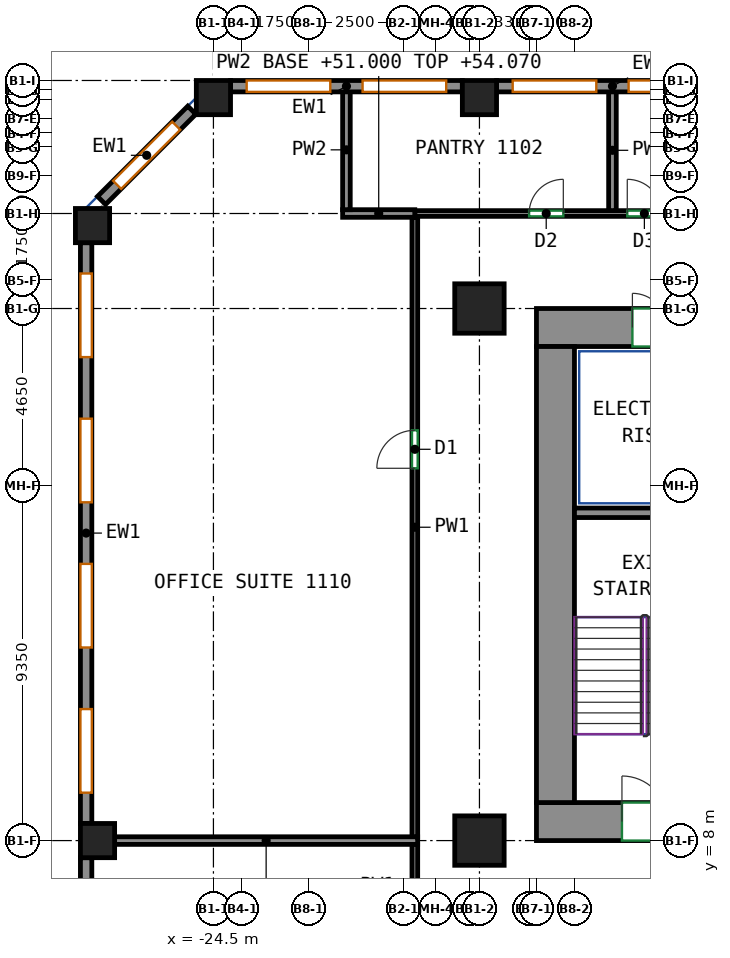
"""IFC4 building model, lengths in metres.
Left out: names, types, materials, properties, quantities, classifications, styles, units other than length and angle.
Written with IfcOpenShell. Run it as: python <this file> out.ifc"""

import sys

from ifc_helpers import new_model, si_unit, direction, frame, frame_2d, origin, origin_2d, place, context, subcontext, project, spatial, rectangle, extrude, source, transform, mapped, element, fill, save


model = new_model("IFC4")
c1 = context("Model", 3, precision=1e-05, world=origin(), true_north=direction((0.0, 1.0)))
c2 = subcontext(c1, "Body", "Model", "MODEL_VIEW")
j1 = project(units=[si_unit("LENGTHUNIT", "METRE"), si_unit("PLANEANGLEUNIT", "RADIAN")], contexts=[c1])
p1 = place(None, origin())
s1 = spatial("IfcSite", under=j1, at=p1, CompositionType="ELEMENT")
p2 = place(p1, origin())
s2 = spatial("IfcBuilding", under=s1, at=p2, CompositionType="ELEMENT")
p3 = place(p2, frame((0.0, 0.0, 51.0)))
s3 = spatial("IfcBuildingStorey", under=s2, at=p3, CompositionType="ELEMENT", Elevation=51.0)
m1 = source(origin(), c2, "Body", "SweptSolid", [
    extrude(rectangle(XDim=0.9, YDim=0.9, at=origin_2d()), origin(), (0.0, 0.0, 1.0), 3.72),
])
for number, where, z_axis, x_axis in (
    (1, (-27.682, 24.182, 0.0), (0.0, 0.0, 1.0), (1.0, 0.0, 0.0)),
    (2, (-27.55, 8.0, 0.0), (0.0, 0.0, 1.0), (1.0, 0.0, 0.0)),
    (3, (-24.5, 27.55, 0.0), (0.0, 0.0, 1.0), (1.0, 0.0, 0.0)),
):
    element("IfcColumn", number, at=place(p3, frame(where, z_axis=z_axis, x_axis=x_axis)), inside=s3, PredefinedType="COLUMN", context=c2, shape_type="MappedRepresentation", body=[
        mapped(m1, transform((0.0, 0.0, 0.0))),
    ])
m2 = source(origin(), c2, "Body", "SweptSolid", [
    extrude(rectangle(XDim=1.3, YDim=1.3, at=origin_2d()), origin(), (0.0, 0.0, 1.0), 3.72),
])
for number, where, z_axis, x_axis in (
    (4, (-17.5, 8.0, 0.0), (0.0, 0.0, 1.0), (1.0, 0.0, 0.0)),
    (5, (-17.5, 22.0, 0.0), (0.0, 0.0, 1.0), (1.0, 0.0, 0.0)),
):
    element("IfcColumn", number, at=place(p3, frame(where, z_axis=z_axis, x_axis=x_axis)), inside=s3, PredefinedType="COLUMN", context=c2, shape_type="MappedRepresentation", body=[
        mapped(m2, transform((0.0, 0.0, 0.0))),
    ])
p4 = place(p3, frame((-17.5, 27.55, 0.0), z_axis=(0.0, 0.0, 1.0), x_axis=(1.0, 0.0, 0.0)))
e6 = element("IfcColumn", 6, at=p4, inside=s3, PredefinedType="COLUMN", context=c2, shape_type="MappedRepresentation", body=[
    mapped(m1, transform((0.0, 0.0, 0.0))),
])
m3 = source(origin(), c2, "Body", "SweptSolid", [
    extrude(rectangle(XDim=5.63, YDim=1.0, at=frame_2d((2.815, 0.0))), origin(), (0.0, 0.0, 1.0), 3.72),
])
p5 = place(p3, frame((-16.0, 8.5, 0.0), z_axis=(0.0, 0.0, 1.0), x_axis=(1.0, 0.0, 0.0)))
e7 = element("IfcWall", 7, at=p5, inside=s3, PredefinedType="SHEAR", context=c2, shape_type="MappedRepresentation", body=[
    mapped(m3, transform((0.0, 0.0, 0.0))),
])
p6 = place(p5, frame((2.25, 0.0, 0.0)))
e8 = element("IfcOpeningElement", 8, at=p6, cuts=e7, PredefinedType="OPENING", context=c2, shape_type="SweptSolid", body=[
    extrude(rectangle(XDim=1.2, YDim=2.1, at=frame_2d((0.6, 1.05))), frame((0.0, 0.51, 0.0), z_axis=(0.0, -1.0, 0.0), x_axis=(1.0, 0.0, 0.0)), (0.0, 0.0, 1.0), 1.02),
])
m4 = source(origin(), c2, "Body", "SweptSolid", [
    extrude(rectangle(XDim=34.1, YDim=1.0, at=frame_2d((17.05, 0.0))), origin(), (0.0, 0.0, 1.0), 3.72),
])
p7 = place(p3, frame((-16.0, 21.5, 0.0), z_axis=(0.0, 0.0, 1.0), x_axis=(1.0, 0.0, 0.0)))
e9 = element("IfcWall", 9, at=p7, inside=s3, PredefinedType="SHEAR", context=c2, shape_type="MappedRepresentation", body=[
    mapped(m4, transform((0.0, 0.0, 0.0))),
])
p8 = place(p7, frame((6.108, 0.0, 0.0)))
e10 = element("IfcOpeningElement", 10, at=p8, cuts=e9, PredefinedType="OPENING", context=c2, shape_type="SweptSolid", body=[
    extrude(rectangle(XDim=0.9, YDim=2.1, at=frame_2d((0.45, 1.05))), frame((0.0, 0.51, 0.0), z_axis=(0.0, -1.0, 0.0), x_axis=(1.0, 0.0, 0.0)), (0.0, 0.0, 1.0), 1.02),
])
p9 = place(p7, frame((11.173, 0.0, 0.0)))
e11 = element("IfcOpeningElement", 11, at=p9, cuts=e9, PredefinedType="OPENING", context=c2, shape_type="SweptSolid", body=[
    extrude(rectangle(XDim=0.9, YDim=2.1, at=frame_2d((0.45, 1.05))), frame((0.0, 0.51, 0.0), z_axis=(0.0, -1.0, 0.0), x_axis=(1.0, 0.0, 0.0)), (0.0, 0.0, 1.0), 1.02),
])
p10 = place(p7, frame((16.238, 0.0, 0.0)))
e12 = element("IfcOpeningElement", 12, at=p10, cuts=e9, PredefinedType="OPENING", context=c2, shape_type="SweptSolid", body=[
    extrude(rectangle(XDim=0.9, YDim=2.1, at=frame_2d((0.45, 1.05))), frame((0.0, 0.51, 0.0), z_axis=(0.0, -1.0, 0.0), x_axis=(1.0, 0.0, 0.0)), (0.0, 0.0, 1.0), 1.02),
])
p11 = place(p7, frame((21.062, 0.0, 0.0)))
e13 = element("IfcOpeningElement", 13, at=p11, cuts=e9, PredefinedType="OPENING", context=c2, shape_type="SweptSolid", body=[
    extrude(rectangle(XDim=0.9, YDim=2.1, at=frame_2d((0.45, 1.05))), frame((0.0, 0.51, 0.0), z_axis=(0.0, -1.0, 0.0), x_axis=(1.0, 0.0, 0.0)), (0.0, 0.0, 1.0), 1.02),
])
p12 = place(p7, frame((26.489, 0.0, 0.0)))
e14 = element("IfcOpeningElement", 14, at=p12, cuts=e9, PredefinedType="OPENING", context=c2, shape_type="SweptSolid", body=[
    extrude(rectangle(XDim=0.9, YDim=2.1, at=frame_2d((0.45, 1.05))), frame((0.0, 0.51, 0.0), z_axis=(0.0, -1.0, 0.0), x_axis=(1.0, 0.0, 0.0)), (0.0, 0.0, 1.0), 1.02),
])
p13 = place(p7, frame((2.525, 0.0, 0.0)))
e15 = element("IfcOpeningElement", 15, at=p13, cuts=e9, PredefinedType="OPENING", context=c2, shape_type="SweptSolid", body=[
    extrude(rectangle(XDim=0.9, YDim=2.1, at=frame_2d((0.45, 1.05))), frame((0.0, 0.51, 0.0), z_axis=(0.0, -1.0, 0.0), x_axis=(1.0, 0.0, 0.0)), (0.0, 0.0, 1.0), 1.02),
])
p14 = place(p7, frame((30.675, 0.0, 0.0)))
e16 = element("IfcOpeningElement", 16, at=p14, cuts=e9, PredefinedType="OPENING", context=c2, shape_type="SweptSolid", body=[
    extrude(rectangle(XDim=0.9, YDim=2.1, at=frame_2d((0.45, 1.05))), frame((0.0, 0.51, 0.0), z_axis=(0.0, -1.0, 0.0), x_axis=(1.0, 0.0, 0.0)), (0.0, 0.0, 1.0), 1.02),
])
m5 = source(origin(), c2, "Body", "SweptSolid", [
    extrude(rectangle(XDim=12.0, YDim=1.0, at=frame_2d((6.0, 0.0))), origin(), (0.0, 0.0, 1.0), 3.72),
])
p15 = place(p3, frame((-15.5, 9.0, 0.0), z_axis=(0.0, 0.0, 1.0), x_axis=(0.0, 1.0, 0.0)))
e17 = element("IfcWall", 17, at=p15, inside=s3, PredefinedType="SHEAR", context=c2, shape_type="MappedRepresentation", body=[
    mapped(m5, transform((0.0, 0.0, 0.0))),
])
m6 = source(origin(), c2, "Body", "SweptSolid", [
    extrude(rectangle(XDim=3.7, YDim=0.25, at=frame_2d((1.85, 0.0))), origin(), (0.0, 0.0, 1.0), 3.72),
])
p16 = place(p3, frame((-15.0, 16.625, 0.0), z_axis=(0.0, 0.0, 1.0), x_axis=(1.0, 0.0, 0.0)))
e18 = element("IfcWall", 18, at=p16, inside=s3, PredefinedType="SHEAR", context=c2, shape_type="MappedRepresentation", body=[
    mapped(m6, transform((0.0, 0.0, 0.0))),
])
m7 = source(origin(), c2, "Body", "SweptSolid", [
    extrude(rectangle(XDim=6.1, YDim=0.3, at=frame_2d((3.05, 0.0))), origin(), (0.0, 0.0, 1.0), 3.72),
])
p17 = place(p3, frame((-10.95, 27.85, 0.0), z_axis=(0.0, 0.0, 1.0), x_axis=(-1.0, 0.0, 0.0)))
e19 = element("IfcWall", 19, at=p17, inside=s3, PredefinedType="SOLIDWALL", context=c2, shape_type="MappedRepresentation", body=[
    mapped(m7, transform((0.0, 0.0, 0.0))),
])
p18 = place(p17, frame((0.425, 0.0, 0.7)))
e20 = element("IfcOpeningElement", 20, at=p18, cuts=e19, PredefinedType="OPENING", context=c2, shape_type="SweptSolid", body=[
    extrude(rectangle(XDim=2.2, YDim=2.25, at=frame_2d((1.1, 1.125))), frame((0.0, 0.16, 0.0), z_axis=(0.0, -1.0, 0.0), x_axis=(1.0, 0.0, 0.0)), (0.0, 0.0, 1.0), 0.32),
])
p19 = place(p17, frame((3.475, 0.0, 0.7)))
e21 = element("IfcOpeningElement", 21, at=p19, cuts=e19, PredefinedType="OPENING", context=c2, shape_type="SweptSolid", body=[
    extrude(rectangle(XDim=2.2, YDim=2.25, at=frame_2d((1.1, 1.125))), frame((0.0, 0.16, 0.0), z_axis=(0.0, -1.0, 0.0), x_axis=(1.0, 0.0, 0.0)), (0.0, 0.0, 1.0), 0.32),
])
p20 = place(p3, frame((-17.95, 27.85, 0.0), z_axis=(0.0, 0.0, 1.0), x_axis=(-1.0, 0.0, 0.0)))
e22 = element("IfcWall", 22, at=p20, inside=s3, PredefinedType="SOLIDWALL", context=c2, shape_type="MappedRepresentation", body=[
    mapped(m7, transform((0.0, 0.0, 0.0))),
])
p21 = place(p20, frame((0.425, 0.0, 0.7)))
e23 = element("IfcOpeningElement", 23, at=p21, cuts=e22, PredefinedType="OPENING", context=c2, shape_type="SweptSolid", body=[
    extrude(rectangle(XDim=2.2, YDim=2.25, at=frame_2d((1.1, 1.125))), frame((0.0, 0.16, 0.0), z_axis=(0.0, -1.0, 0.0), x_axis=(1.0, 0.0, 0.0)), (0.0, 0.0, 1.0), 0.32),
])
p22 = place(p20, frame((3.475, 0.0, 0.7)))
e24 = element("IfcOpeningElement", 24, at=p22, cuts=e22, PredefinedType="OPENING", context=c2, shape_type="SweptSolid", body=[
    extrude(rectangle(XDim=2.2, YDim=2.25, at=frame_2d((1.1, 1.125))), frame((0.0, 0.16, 0.0), z_axis=(0.0, -1.0, 0.0), x_axis=(1.0, 0.0, 0.0)), (0.0, 0.0, 1.0), 0.32),
])
m8 = source(origin(), c2, "Body", "SweptSolid", [
    extrude(rectangle(XDim=3.359, YDim=0.3, at=frame_2d((1.679, 0.0))), origin(), (0.0, 0.0, 1.0), 3.72),
])
p23 = place(p3, frame((-25.069, 27.219, 0.0), z_axis=(0.0, 0.0, 1.0), x_axis=(-0.707143122278, -0.707070438228, 0.0)))
e25 = element("IfcWall", 25, at=p23, inside=s3, PredefinedType="SOLIDWALL", context=c2, shape_type="MappedRepresentation", body=[
    mapped(m8, transform((0.0, 0.0, 0.0))),
])
p24 = place(p23, frame((0.579, 0.0, 0.7)))
e26 = element("IfcOpeningElement", 26, at=p24, cuts=e25, PredefinedType="OPENING", context=c2, shape_type="SweptSolid", body=[
    extrude(rectangle(XDim=2.2, YDim=2.25, at=frame_2d((1.1, 1.125))), frame((0.0, 0.16, 0.0), z_axis=(0.0, -1.0, 0.0), x_axis=(1.0, 0.0, 0.0)), (0.0, 0.0, 1.0), 0.32),
])
m9 = source(origin(), c2, "Body", "SweptSolid", [
    extrude(rectangle(XDim=15.282, YDim=0.3, at=frame_2d((7.641, 0.0))), origin(), (0.0, 0.0, 1.0), 3.72),
])
p25 = place(p3, frame((-27.85, 23.732, 0.0), z_axis=(0.0, 0.0, 1.0), x_axis=(0.0, -1.0, 0.0)))
e27 = element("IfcWall", 27, at=p25, inside=s3, PredefinedType="SOLIDWALL", context=c2, shape_type="MappedRepresentation", body=[
    mapped(m9, transform((0.0, 0.0, 0.0))),
])
p26 = place(p25, frame((0.81, 0.0, 0.7)))
e28 = element("IfcOpeningElement", 28, at=p26, cuts=e27, PredefinedType="OPENING", context=c2, shape_type="SweptSolid", body=[
    extrude(rectangle(XDim=2.2, YDim=2.25, at=frame_2d((1.1, 1.125))), frame((0.0, 0.16, 0.0), z_axis=(0.0, -1.0, 0.0), x_axis=(1.0, 0.0, 0.0)), (0.0, 0.0, 1.0), 0.32),
])
p27 = place(p25, frame((4.631, 0.0, 0.7)))
e29 = element("IfcOpeningElement", 29, at=p27, cuts=e27, PredefinedType="OPENING", context=c2, shape_type="SweptSolid", body=[
    extrude(rectangle(XDim=2.2, YDim=2.25, at=frame_2d((1.1, 1.125))), frame((0.0, 0.16, 0.0), z_axis=(0.0, -1.0, 0.0), x_axis=(1.0, 0.0, 0.0)), (0.0, 0.0, 1.0), 0.32),
])
p28 = place(p25, frame((8.451, 0.0, 0.7)))
e30 = element("IfcOpeningElement", 30, at=p28, cuts=e27, PredefinedType="OPENING", context=c2, shape_type="SweptSolid", body=[
    extrude(rectangle(XDim=2.2, YDim=2.25, at=frame_2d((1.1, 1.125))), frame((0.0, 0.16, 0.0), z_axis=(0.0, -1.0, 0.0), x_axis=(1.0, 0.0, 0.0)), (0.0, 0.0, 1.0), 0.32),
])
p29 = place(p25, frame((12.271, 0.0, 0.7)))
e31 = element("IfcOpeningElement", 31, at=p29, cuts=e27, PredefinedType="OPENING", context=c2, shape_type="SweptSolid", body=[
    extrude(rectangle(XDim=2.2, YDim=2.25, at=frame_2d((1.1, 1.125))), frame((0.0, 0.16, 0.0), z_axis=(0.0, -1.0, 0.0), x_axis=(1.0, 0.0, 0.0)), (0.0, 0.0, 1.0), 0.32),
])
m10 = source(origin(), c2, "Body", "SweptSolid", [
    extrude(rectangle(XDim=8.1, YDim=0.3, at=frame_2d((4.05, 0.0))), origin(), (0.0, 0.0, 1.0), 3.72),
])
p30 = place(p3, frame((-27.85, 7.55, 0.0), z_axis=(0.0, 0.0, 1.0), x_axis=(0.0, -1.0, 0.0)))
e32 = element("IfcWall", 32, at=p30, inside=s3, PredefinedType="SOLIDWALL", context=c2, shape_type="MappedRepresentation", body=[
    mapped(m10, transform((0.0, 0.0, 0.0))),
])
p31 = place(p30, frame((0.925, 0.0, 0.7)))
e33 = element("IfcOpeningElement", 33, at=p31, cuts=e32, PredefinedType="OPENING", context=c2, shape_type="SweptSolid", body=[
    extrude(rectangle(XDim=2.2, YDim=2.25, at=frame_2d((1.1, 1.125))), frame((0.0, 0.16, 0.0), z_axis=(0.0, -1.0, 0.0), x_axis=(1.0, 0.0, 0.0)), (0.0, 0.0, 1.0), 0.32),
])
p32 = place(p30, frame((4.975, 0.0, 0.7)))
e34 = element("IfcOpeningElement", 34, at=p32, cuts=e32, PredefinedType="OPENING", context=c2, shape_type="SweptSolid", body=[
    extrude(rectangle(XDim=2.2, YDim=2.25, at=frame_2d((1.1, 1.125))), frame((0.0, 0.16, 0.0), z_axis=(0.0, -1.0, 0.0), x_axis=(1.0, 0.0, 0.0)), (0.0, 0.0, 1.0), 0.32),
])
p33 = place(p3, frame((-19.2, 5.675, 0.0), z_axis=(0.0, 0.0, 1.0), x_axis=(0.0, 1.0, 0.0)))
e35 = element("IfcWall", 35, at=p33, inside=s3, PredefinedType="PARTITIONING", context=c2, shape_type="SweptSolid", body=[
    extrude(rectangle(XDim=2.235, YDim=0.15, at=frame_2d((1.117, 0.0))), origin(), (0.0, 0.0, 1.0), 3.72),
])
p34 = place(p3, frame((-19.2, 24.5, 0.0), z_axis=(0.0, 0.0, 1.0), x_axis=(1.0, 0.0, 0.0)))
e36 = element("IfcWall", 36, at=p34, inside=s3, PredefinedType="PARTITIONING", context=c2, shape_type="SweptSolid", body=[
    extrude(rectangle(XDim=40.275, YDim=0.15, at=frame_2d((20.137, 0.0))), origin(), (0.0, 0.0, 1.0), 3.07),
])
p35 = place(p34, frame((3.007, 0.0, 0.0)))
e37 = element("IfcOpeningElement", 37, at=p35, cuts=e36, PredefinedType="OPENING", context=c2, shape_type="SweptSolid", body=[
    extrude(rectangle(XDim=0.9, YDim=2.1, at=frame_2d((0.45, 1.05))), frame((0.0, 0.085, 0.0), z_axis=(0.0, -1.0, 0.0), x_axis=(1.0, 0.0, 0.0)), (0.0, 0.0, 1.0), 0.17),
])
p36 = place(p34, frame((5.59, 0.0, 0.0)))
e38 = element("IfcOpeningElement", 38, at=p36, cuts=e36, PredefinedType="OPENING", context=c2, shape_type="SweptSolid", body=[
    extrude(rectangle(XDim=0.9, YDim=2.1, at=frame_2d((0.45, 1.05))), frame((0.0, 0.085, 0.0), z_axis=(0.0, -1.0, 0.0), x_axis=(1.0, 0.0, 0.0)), (0.0, 0.0, 1.0), 0.17),
])
p37 = place(p34, frame((38.674, 0.0, 0.0)))
e39 = element("IfcOpeningElement", 39, at=p37, cuts=e36, PredefinedType="OPENING", context=c2, shape_type="SweptSolid", body=[
    extrude(rectangle(XDim=1.0, YDim=2.1, at=frame_2d((0.5, 1.05))), frame((0.0, 0.085, 0.0), z_axis=(0.0, -1.0, 0.0), x_axis=(1.0, 0.0, 0.0)), (0.0, 0.0, 1.0), 0.17),
])
p38 = place(p3, frame((-19.2, 8.09, 0.0), z_axis=(0.0, 0.0, 1.0), x_axis=(0.0, 1.0, 0.0)))
e40 = element("IfcWall", 40, at=p38, inside=s3, PredefinedType="PARTITIONING", context=c2, shape_type="SweptSolid", body=[
    extrude(rectangle(XDim=16.31, YDim=0.15, at=frame_2d((8.155, 0.0))), origin(), (0.0, 0.0, 1.0), 3.72),
])
p39 = place(p38, frame((9.706, 0.0, 0.0)))
e41 = element("IfcOpeningElement", 41, at=p39, cuts=e40, PredefinedType="OPENING", context=c2, shape_type="SweptSolid", body=[
    extrude(rectangle(XDim=1.0, YDim=2.1, at=frame_2d((0.5, 1.05))), frame((0.0, 0.085, 0.0), z_axis=(0.0, -1.0, 0.0), x_axis=(1.0, 0.0, 0.0)), (0.0, 0.0, 1.0), 0.17),
])
p40 = place(p3, frame((-19.126, 8.0, 0.0), z_axis=(0.0, 0.0, 1.0), x_axis=(-1.0, 0.0, 0.0)))
e42 = element("IfcWall", 42, at=p40, inside=s3, PredefinedType="PARTITIONING", context=c2, shape_type="SweptSolid", body=[
    extrude(rectangle(XDim=7.974, YDim=0.2, at=frame_2d((3.987, 0.0))), origin(), (0.0, 0.0, 1.0), 3.07),
])
p41 = place(p3, frame((-14.0, 27.75, 0.0), z_axis=(0.0, 0.0, 1.0), x_axis=(0.0, -1.0, 0.0)))
e43 = element("IfcWall", 43, at=p41, inside=s3, PredefinedType="PARTITIONING", context=c2, shape_type="SweptSolid", body=[
    extrude(rectangle(XDim=3.174, YDim=0.2, at=frame_2d((1.587, 0.0))), origin(), (0.0, 0.0, 1.0), 3.72),
])
p42 = place(p3, frame((-21.1, 24.5, 0.0), z_axis=(0.0, 0.0, 1.0), x_axis=(1.0, 0.0, 0.0)))
e44 = element("IfcWall", 44, at=p42, inside=s3, PredefinedType="PARTITIONING", context=c2, shape_type="SweptSolid", body=[
    extrude(rectangle(XDim=1.899, YDim=0.2, at=frame_2d((0.95, 0.0))), origin(), (0.0, 0.0, 1.0), 3.07),
])
p43 = place(p3, frame((-21.0, 24.6, 0.0), z_axis=(0.0, 0.0, 1.0), x_axis=(0.0, 1.0, 0.0)))
e45 = element("IfcWall", 45, at=p43, inside=s3, PredefinedType="PARTITIONING", context=c2, shape_type="SweptSolid", body=[
    extrude(rectangle(XDim=3.15, YDim=0.2, at=frame_2d((1.575, 0.0))), origin(), (0.0, 0.0, 1.0), 3.72),
])
p44 = place(p18, origin())
e46 = element("IfcWindow", 46, at=p44, inside=s3, PartitioningType="SINGLE_PANEL", PredefinedType="WINDOW", context=c2, shape_type="SweptSolid", body=[
    extrude(rectangle(XDim=2.2, YDim=2.25, at=frame_2d((1.1, 1.125))), frame((0.0, 0.03, 0.0), z_axis=(0.0, -1.0, 0.0), x_axis=(1.0, 0.0, 0.0)), (0.0, 0.0, 1.0), 0.06),
])
fill(e20, e46)
p45 = place(p19, origin())
e47 = element("IfcWindow", 47, at=p45, inside=s3, PartitioningType="SINGLE_PANEL", PredefinedType="WINDOW", context=c2, shape_type="SweptSolid", body=[
    extrude(rectangle(XDim=2.2, YDim=2.25, at=frame_2d((1.1, 1.125))), frame((0.0, 0.03, 0.0), z_axis=(0.0, -1.0, 0.0), x_axis=(1.0, 0.0, 0.0)), (0.0, 0.0, 1.0), 0.06),
])
fill(e21, e47)
p46 = place(p21, origin())
e48 = element("IfcWindow", 48, at=p46, inside=s3, PartitioningType="SINGLE_PANEL", PredefinedType="WINDOW", context=c2, shape_type="SweptSolid", body=[
    extrude(rectangle(XDim=2.2, YDim=2.25, at=frame_2d((1.1, 1.125))), frame((0.0, 0.03, 0.0), z_axis=(0.0, -1.0, 0.0), x_axis=(1.0, 0.0, 0.0)), (0.0, 0.0, 1.0), 0.06),
])
fill(e23, e48)
p47 = place(p22, origin())
e49 = element("IfcWindow", 49, at=p47, inside=s3, PartitioningType="SINGLE_PANEL", PredefinedType="WINDOW", context=c2, shape_type="SweptSolid", body=[
    extrude(rectangle(XDim=2.2, YDim=2.25, at=frame_2d((1.1, 1.125))), frame((0.0, 0.03, 0.0), z_axis=(0.0, -1.0, 0.0), x_axis=(1.0, 0.0, 0.0)), (0.0, 0.0, 1.0), 0.06),
])
fill(e24, e49)
p48 = place(p24, origin())
e50 = element("IfcWindow", 50, at=p48, inside=s3, PartitioningType="SINGLE_PANEL", PredefinedType="WINDOW", context=c2, shape_type="SweptSolid", body=[
    extrude(rectangle(XDim=2.2, YDim=2.25, at=frame_2d((1.1, 1.125))), frame((0.0, 0.03, 0.0), z_axis=(0.0, -1.0, 0.0), x_axis=(1.0, 0.0, 0.0)), (0.0, 0.0, 1.0), 0.06),
])
fill(e26, e50)
p49 = place(p26, origin())
e51 = element("IfcWindow", 51, at=p49, inside=s3, PartitioningType="SINGLE_PANEL", PredefinedType="WINDOW", context=c2, shape_type="SweptSolid", body=[
    extrude(rectangle(XDim=2.2, YDim=2.25, at=frame_2d((1.1, 1.125))), frame((0.0, 0.03, 0.0), z_axis=(0.0, -1.0, 0.0), x_axis=(1.0, 0.0, 0.0)), (0.0, 0.0, 1.0), 0.06),
])
fill(e28, e51)
p50 = place(p27, origin())
e52 = element("IfcWindow", 52, at=p50, inside=s3, PartitioningType="SINGLE_PANEL", PredefinedType="WINDOW", context=c2, shape_type="SweptSolid", body=[
    extrude(rectangle(XDim=2.2, YDim=2.25, at=frame_2d((1.1, 1.125))), frame((0.0, 0.03, 0.0), z_axis=(0.0, -1.0, 0.0), x_axis=(1.0, 0.0, 0.0)), (0.0, 0.0, 1.0), 0.06),
])
fill(e29, e52)
p51 = place(p28, origin())
e53 = element("IfcWindow", 53, at=p51, inside=s3, PartitioningType="SINGLE_PANEL", PredefinedType="WINDOW", context=c2, shape_type="SweptSolid", body=[
    extrude(rectangle(XDim=2.2, YDim=2.25, at=frame_2d((1.1, 1.125))), frame((0.0, 0.03, 0.0), z_axis=(0.0, -1.0, 0.0), x_axis=(1.0, 0.0, 0.0)), (0.0, 0.0, 1.0), 0.06),
])
fill(e30, e53)
p52 = place(p29, origin())
e54 = element("IfcWindow", 54, at=p52, inside=s3, PartitioningType="SINGLE_PANEL", PredefinedType="WINDOW", context=c2, shape_type="SweptSolid", body=[
    extrude(rectangle(XDim=2.2, YDim=2.25, at=frame_2d((1.1, 1.125))), frame((0.0, 0.03, 0.0), z_axis=(0.0, -1.0, 0.0), x_axis=(1.0, 0.0, 0.0)), (0.0, 0.0, 1.0), 0.06),
])
fill(e31, e54)
p53 = place(p13, origin())
e55 = element("IfcDoor", 55, at=p53, inside=s3, OperationType="SINGLE_SWING_LEFT", PredefinedType="DOOR", context=c2, shape_type="SweptSolid", body=[
    extrude(rectangle(XDim=0.9, YDim=2.1, at=frame_2d((0.45, 1.05))), frame((0.0, -0.355, 0.0), z_axis=(0.0, -1.0, 0.0), x_axis=(1.0, 0.0, 0.0)), (0.0, 0.0, 1.0), 0.05),
])
fill(e15, e55)
p54 = place(p6, origin())
e56 = element("IfcDoor", 56, at=p54, inside=s3, OperationType="DOUBLE_DOOR_SINGLE_SWING", PredefinedType="DOOR", context=c2, shape_type="SweptSolid", body=[
    extrude(rectangle(XDim=1.2, YDim=2.1, at=frame_2d((0.6, 1.05))), frame((0.0, 0.405, 0.0), z_axis=(0.0, -1.0, 0.0), x_axis=(1.0, 0.0, 0.0)), (0.0, 0.0, 1.0), 0.05),
])
fill(e8, e56)
p55 = place(p39, origin())
e57 = element("IfcDoor", 57, at=p55, inside=s3, OperationType="SINGLE_SWING_LEFT", PredefinedType="DOOR", context=c2, shape_type="SweptSolid", body=[
    extrude(rectangle(XDim=1.0, YDim=2.1, at=frame_2d((0.5, 1.05))), frame((0.0, 0.025, 0.0), z_axis=(0.0, -1.0, 0.0), x_axis=(1.0, 0.0, 0.0)), (0.0, 0.0, 1.0), 0.05),
])
fill(e41, e57)
p56 = place(p35, origin())
e58 = element("IfcDoor", 58, at=p56, inside=s3, OperationType="SINGLE_SWING_RIGHT", PredefinedType="DOOR", context=c2, shape_type="SweptSolid", body=[
    extrude(rectangle(XDim=0.9, YDim=2.1, at=frame_2d((0.45, 1.05))), frame((0.0, 0.025, 0.0), z_axis=(0.0, -1.0, 0.0), x_axis=(1.0, 0.0, 0.0)), (0.0, 0.0, 1.0), 0.05),
])
fill(e37, e58)
p57 = place(p36, origin())
e59 = element("IfcDoor", 59, at=p57, inside=s3, OperationType="SINGLE_SWING_LEFT", PredefinedType="DOOR", context=c2, shape_type="SweptSolid", body=[
    extrude(rectangle(XDim=0.9, YDim=2.1, at=frame_2d((0.45, 1.05))), frame((0.0, 0.025, 0.0), z_axis=(0.0, -1.0, 0.0), x_axis=(1.0, 0.0, 0.0)), (0.0, 0.0, 1.0), 0.05),
])
fill(e38, e59)
save(model, sys.argv[1])
